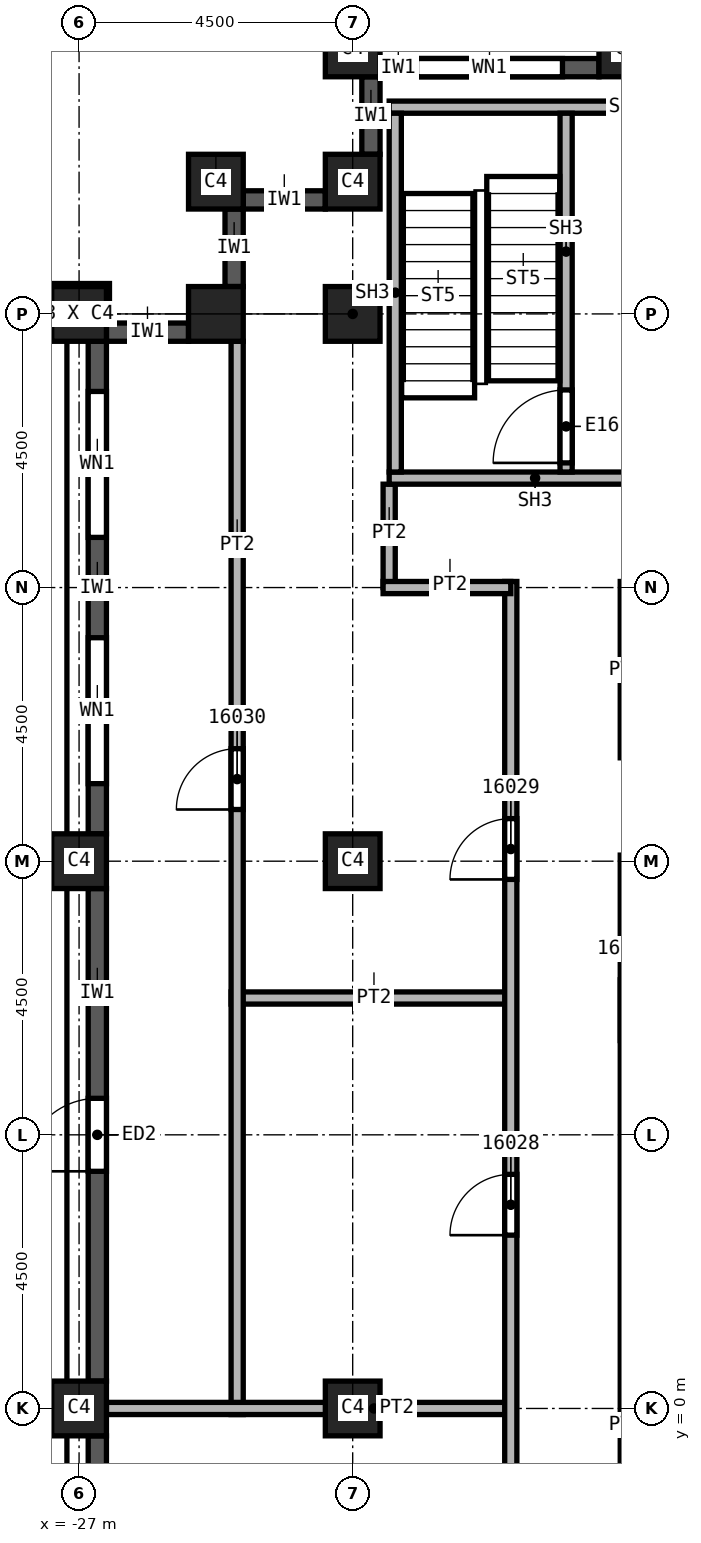
"""IFC4 building model, lengths in metres.
Left out: names, types, materials, properties, quantities, classifications, styles, units other than length and angle.
Written with IfcOpenShell. Run it as: python <this file> out.ifc"""

import sys

from ifc_helpers import new_model, si_unit, direction, frame, frame_2d, origin, origin_2d, place, context, subcontext, project, spatial, rectangle, extrude, element, fill, save


model = new_model("IFC4")
c1 = context("Model", 3, precision=1e-05, world=origin(), true_north=direction((0.0, 1.0)))
c2 = subcontext(c1, "Body", "Model", "MODEL_VIEW")
j1 = project(units=[si_unit("LENGTHUNIT", "METRE"), si_unit("PLANEANGLEUNIT", "RADIAN")], contexts=[c1])
p1 = place(None, origin())
s1 = spatial("IfcSite", under=j1, at=p1, CompositionType="ELEMENT")
p2 = place(p1, origin())
s2 = spatial("IfcBuilding", under=s1, at=p2, CompositionType="ELEMENT")
p3 = place(p2, frame((0.0, 0.0, 242.0)))
s3 = spatial("IfcBuildingStorey", under=s2, at=p3, CompositionType="ELEMENT", Elevation=242.0)
for number, where, z_axis, x_axis in (
    (1, (-22.5, 0.0, 0.0), (0.0, 0.0, 1.0), (1.0, 0.0, 0.0)),
    (2, (-22.5, 9.0, 0.0), (0.0, 0.0, 1.0), (1.0, 0.0, 0.0)),
    (3, (-22.5, 18.0, 0.0), (0.0, 0.0, 1.0), (1.0, 0.0, 0.0)),
    (4, (-18.0, 22.35, 0.0), (0.0, 0.0, 1.0), (1.0, 0.0, 0.0)),
    (5, (-22.5, 22.35, 0.0), (0.0, 0.0, 1.0), (1.0, 0.0, 0.0)),
    (6, (-27.0, 0.0, 0.0), (0.0, 0.0, 1.0), (0.0, 1.0, 0.0)),
    (7, (-27.0, 9.0, 0.0), (0.0, 0.0, 1.0), (0.0, 1.0, 0.0)),
    (8, (-27.0, 18.0, 0.0), (0.0, 0.0, 1.0), (0.0, 1.0, 0.0)),
    (9, (-22.5, 20.175, 0.0), (0.0, 0.0, 1.0), (1.0, 0.0, 0.0)),
    (10, (-24.75, 20.175, 0.0), (0.0, 0.0, 1.0), (1.0, 0.0, 0.0)),
    (11, (-24.75, 18.0, 0.0), (0.0, 0.0, 1.0), (1.0, 0.0, 0.0)),
):
    element("IfcColumn", number, at=place(p3, frame(where, z_axis=z_axis, x_axis=x_axis)), inside=s3, PredefinedType="COLUMN", context=c2, shape_type="SweptSolid", body=[
        extrude(rectangle(XDim=0.9, YDim=0.9, at=origin_2d()), origin(), (0.0, 0.0, 1.0), 3.72),
    ])
p4 = place(p3, frame((-24.45, 19.725, 0.0), z_axis=(0.0, 0.0, 1.0), x_axis=(0.0, -1.0, 0.0)))
e12 = element("IfcWall", 12, at=p4, inside=s3, PredefinedType="SOLIDWALL", context=c2, shape_type="SweptSolid", body=[
    extrude(rectangle(XDim=1.275, YDim=0.3, at=frame_2d((0.638, 0.0))), origin(), (0.0, 0.0, 1.0), 3.12),
])
p5 = place(p3, frame((-25.2, 17.7, 0.0), z_axis=(0.0, 0.0, 1.0), x_axis=(-1.0, 0.0, 0.0)))
e13 = element("IfcWall", 13, at=p5, inside=s3, PredefinedType="SOLIDWALL", context=c2, shape_type="SweptSolid", body=[
    extrude(rectangle(XDim=1.35, YDim=0.3, at=frame_2d((0.675, 0.0))), origin(), (0.0, 0.0, 1.0), 3.12),
])
p6 = place(p3, frame((-26.7, 17.55, 0.0), z_axis=(0.0, 0.0, 1.0), x_axis=(0.0, -1.0, 0.0)))
e14 = element("IfcWall", 14, at=p6, inside=s3, PredefinedType="SOLIDWALL", context=c2, shape_type="SweptSolid", body=[
    extrude(rectangle(XDim=8.1, YDim=0.3, at=frame_2d((4.05, 0.0))), origin(), (0.0, 0.0, 1.0), 3.12),
])
p7 = place(p6, frame((0.825, 0.0, 0.8)))
e15 = element("IfcOpeningElement", 15, at=p7, cuts=e14, PredefinedType="OPENING", context=c2, shape_type="SweptSolid", body=[
    extrude(rectangle(XDim=2.4, YDim=1.95, at=frame_2d((1.2, 0.975))), frame((0.0, 0.15, 0.0), z_axis=(0.0, -1.0, 0.0), x_axis=(1.0, 0.0, 0.0)), (0.0, 0.0, 1.0), 0.3),
])
p8 = place(p6, frame((4.875, 0.0, 0.8)))
e16 = element("IfcOpeningElement", 16, at=p8, cuts=e14, PredefinedType="OPENING", context=c2, shape_type="SweptSolid", body=[
    extrude(rectangle(XDim=2.4, YDim=1.95, at=frame_2d((1.2, 0.975))), frame((0.0, 0.15, 0.0), z_axis=(0.0, -1.0, 0.0), x_axis=(1.0, 0.0, 0.0)), (0.0, 0.0, 1.0), 0.3),
])
p9 = place(p3, frame((-26.7, 0.45, 0.0), z_axis=(0.0, 0.0, 1.0), x_axis=(0.0, 1.0, 0.0)))
e17 = element("IfcWall", 17, at=p9, inside=s3, PredefinedType="SOLIDWALL", context=c2, shape_type="SweptSolid", body=[
    extrude(rectangle(XDim=8.1, YDim=0.3, at=frame_2d((4.05, 0.0))), origin(), (0.0, 0.0, 1.0), 3.12),
])
p10 = place(p9, frame((3.45, 0.0, 0.0)))
e18 = element("IfcOpeningElement", 18, at=p10, cuts=e17, PredefinedType="OPENING", context=c2, shape_type="SweptSolid", body=[
    extrude(rectangle(XDim=1.2, YDim=2.4, at=frame_2d((0.6, 1.2))), frame((0.0, 0.15, 0.0), z_axis=(0.0, -1.0, 0.0), x_axis=(1.0, 0.0, 0.0)), (0.0, 0.0, 1.0), 0.3),
])
p11 = place(p3, frame((-26.7, -0.45, 0.0), z_axis=(0.0, 0.0, 1.0), x_axis=(0.0, -1.0, 0.0)))
e19 = element("IfcWall", 19, at=p11, inside=s3, PredefinedType="SOLIDWALL", context=c2, shape_type="SweptSolid", body=[
    extrude(rectangle(XDim=8.1, YDim=0.3, at=frame_2d((4.05, 0.0))), origin(), (0.0, 0.0, 1.0), 3.12),
])
p12 = place(p11, frame((0.825, 0.0, 0.8)))
e20 = element("IfcOpeningElement", 20, at=p12, cuts=e19, PredefinedType="OPENING", context=c2, shape_type="SweptSolid", body=[
    extrude(rectangle(XDim=2.4, YDim=1.95, at=frame_2d((1.2, 0.975))), frame((0.0, 0.15, 0.0), z_axis=(0.0, -1.0, 0.0), x_axis=(1.0, 0.0, 0.0)), (0.0, 0.0, 1.0), 0.3),
])
p13 = place(p11, frame((4.875, 0.0, 0.8)))
e21 = element("IfcOpeningElement", 21, at=p13, cuts=e19, PredefinedType="OPENING", context=c2, shape_type="SweptSolid", body=[
    extrude(rectangle(XDim=2.4, YDim=1.95, at=frame_2d((1.2, 0.975))), frame((0.0, 0.15, 0.0), z_axis=(0.0, -1.0, 0.0), x_axis=(1.0, 0.0, 0.0)), (0.0, 0.0, 1.0), 0.3),
])
p14 = place(p3, frame((-18.45, 22.05, 0.0), z_axis=(0.0, 0.0, 1.0), x_axis=(-1.0, 0.0, 0.0)))
e22 = element("IfcWall", 22, at=p14, inside=s3, PredefinedType="SOLIDWALL", context=c2, shape_type="SweptSolid", body=[
    extrude(rectangle(XDim=3.6, YDim=0.3, at=frame_2d((1.8, 0.0))), origin(), (0.0, 0.0, 1.0), 3.12),
])
p15 = place(p14, frame((0.6, 0.0, 0.8)))
e23 = element("IfcOpeningElement", 23, at=p15, cuts=e22, PredefinedType="OPENING", context=c2, shape_type="SweptSolid", body=[
    extrude(rectangle(XDim=2.4, YDim=1.95, at=frame_2d((1.2, 0.975))), frame((0.0, 0.15, 0.0), z_axis=(0.0, -1.0, 0.0), x_axis=(1.0, 0.0, 0.0)), (0.0, 0.0, 1.0), 0.3),
])
p16 = place(p3, frame((-22.2, 21.9, 0.0), z_axis=(0.0, 0.0, 1.0), x_axis=(0.0, -1.0, 0.0)))
e24 = element("IfcWall", 24, at=p16, inside=s3, PredefinedType="SOLIDWALL", context=c2, shape_type="SweptSolid", body=[
    extrude(rectangle(XDim=1.275, YDim=0.3, at=frame_2d((0.637, 0.0))), origin(), (0.0, 0.0, 1.0), 3.12),
])
p17 = place(p3, frame((-22.95, 19.875, 0.0), z_axis=(0.0, 0.0, 1.0), x_axis=(-1.0, 0.0, 0.0)))
e25 = element("IfcWall", 25, at=p17, inside=s3, PredefinedType="SOLIDWALL", context=c2, shape_type="SweptSolid", body=[
    extrude(rectangle(XDim=1.35, YDim=0.3, at=frame_2d((0.675, 0.0))), origin(), (0.0, 0.0, 1.0), 3.12),
])
p18 = place(p3, frame((-24.5, 6.75, 0.0), z_axis=(0.0, 0.0, 1.0), x_axis=(1.0, 0.0, 0.0)))
e26 = element("IfcWall", 26, at=p18, inside=s3, PredefinedType="PARTITIONING", context=c2, shape_type="SweptSolid", body=[
    extrude(rectangle(XDim=4.6, YDim=0.2, at=frame_2d((2.3, 0.0))), origin(), (0.0, 0.0, 1.0), 3.72),
])
p19 = place(p3, frame((-24.4, -0.1, 0.0), z_axis=(0.0, 0.0, 1.0), x_axis=(0.0, 1.0, 0.0)))
e27 = element("IfcWall", 27, at=p19, inside=s3, PredefinedType="PARTITIONING", context=c2, shape_type="SweptSolid", body=[
    extrude(rectangle(XDim=17.65, YDim=0.2, at=frame_2d((8.825, 0.0))), origin(), (0.0, 0.0, 1.0), 3.72),
])
p20 = place(p19, frame((9.95, 0.0, 0.0)))
e28 = element("IfcOpeningElement", 28, at=p20, cuts=e27, PredefinedType="OPENING", context=c2, shape_type="SweptSolid", body=[
    extrude(rectangle(XDim=1.0, YDim=2.1, at=frame_2d((0.5, 1.05))), frame((0.0, 0.1, 0.0), z_axis=(0.0, -1.0, 0.0), x_axis=(1.0, 0.0, 0.0)), (0.0, 0.0, 1.0), 0.2),
])
p21 = place(p3, frame((-19.9, 0.0, 0.0), z_axis=(0.0, 0.0, 1.0), x_axis=(-1.0, 0.0, 0.0)))
e29 = element("IfcWall", 29, at=p21, inside=s3, PredefinedType="PARTITIONING", context=c2, shape_type="SweptSolid", body=[
    extrude(rectangle(XDim=6.65, YDim=0.2, at=frame_2d((3.325, 0.0))), origin(), (0.0, 0.0, 1.0), 3.72),
])
p22 = place(p3, frame((-21.9, 13.5, 0.0), z_axis=(0.0, 0.0, 1.0), x_axis=(0.0, 1.0, 0.0)))
e30 = element("IfcWall", 30, at=p22, inside=s3, PredefinedType="PARTITIONING", context=c2, shape_type="SweptSolid", body=[
    extrude(rectangle(XDim=1.7, YDim=0.2, at=frame_2d((0.85, 0.0))), origin(), (0.0, 0.0, 1.0), 3.72),
])
p23 = place(p3, frame((-19.9, -8.7, 0.0), z_axis=(0.0, 0.0, 1.0), x_axis=(0.0, 1.0, 0.0)))
e31 = element("IfcWall", 31, at=p23, inside=s3, PredefinedType="PARTITIONING", context=c2, shape_type="SweptSolid", body=[
    extrude(rectangle(XDim=22.3, YDim=0.2, at=frame_2d((11.15, 0.0))), origin(), (0.0, 0.0, 1.0), 3.72),
])
p24 = place(p23, frame((11.55, 0.0, 0.0)))
e32 = element("IfcOpeningElement", 32, at=p24, cuts=e31, PredefinedType="OPENING", context=c2, shape_type="SweptSolid", body=[
    extrude(rectangle(XDim=1.0, YDim=2.1, at=frame_2d((0.5, 1.05))), frame((0.0, 0.1, 0.0), z_axis=(0.0, -1.0, 0.0), x_axis=(1.0, 0.0, 0.0)), (0.0, 0.0, 1.0), 0.2),
])
p25 = place(p23, frame((17.4, 0.0, 0.0)))
e33 = element("IfcOpeningElement", 33, at=p25, cuts=e31, PredefinedType="OPENING", context=c2, shape_type="SweptSolid", body=[
    extrude(rectangle(XDim=1.0, YDim=2.1, at=frame_2d((0.5, 1.05))), frame((0.0, 0.1, 0.0), z_axis=(0.0, -1.0, 0.0), x_axis=(1.0, 0.0, 0.0)), (0.0, 0.0, 1.0), 0.2),
])
p26 = place(p23, frame((1.15, 0.0, 0.0)))
e34 = element("IfcOpeningElement", 34, at=p26, cuts=e31, PredefinedType="OPENING", context=c2, shape_type="SweptSolid", body=[
    extrude(rectangle(XDim=1.0, YDim=2.1, at=frame_2d((0.5, 1.05))), frame((0.0, 0.1, 0.0), z_axis=(0.0, -1.0, 0.0), x_axis=(1.0, 0.0, 0.0)), (0.0, 0.0, 1.0), 0.2),
])
p27 = place(p3, frame((-19.9, 13.5, 0.0), z_axis=(0.0, 0.0, 1.0), x_axis=(-1.0, 0.0, 0.0)))
e35 = element("IfcWall", 35, at=p27, inside=s3, PredefinedType="PARTITIONING", context=c2, shape_type="SweptSolid", body=[
    extrude(rectangle(XDim=2.1, YDim=0.2, at=frame_2d((1.05, 0.0))), origin(), (0.0, 0.0, 1.0), 3.72),
])
p28 = place(p3, frame((-18.0, 9.1, 0.0), z_axis=(0.0, 0.0, 1.0), x_axis=(0.0, -1.0, 0.0)))
e36 = element("IfcWall", 36, at=p28, inside=s3, PredefinedType="PARTITIONING", context=c2, shape_type="SweptSolid", body=[
    extrude(rectangle(XDim=17.8, YDim=0.2, at=frame_2d((8.9, 0.0))), origin(), (0.0, 0.0, 1.0), 3.72),
])
p29 = place(p28, frame((11.8, 0.0, 0.0)))
e37 = element("IfcOpeningElement", 37, at=p29, cuts=e36, PredefinedType="OPENING", context=c2, shape_type="SweptSolid", body=[
    extrude(rectangle(XDim=1.0, YDim=2.1, at=frame_2d((0.5, 1.05))), frame((0.0, 0.1, 0.0), z_axis=(0.0, -1.0, 0.0), x_axis=(1.0, 0.0, 0.0)), (0.0, 0.0, 1.0), 0.2),
])
p30 = place(p28, frame((2.05, 0.0, 0.0)))
e38 = element("IfcOpeningElement", 38, at=p30, cuts=e36, PredefinedType="OPENING", context=c2, shape_type="SweptSolid", body=[
    extrude(rectangle(XDim=1.0, YDim=2.1, at=frame_2d((0.5, 1.05))), frame((0.0, 0.1, 0.0), z_axis=(0.0, -1.0, 0.0), x_axis=(1.0, 0.0, 0.0)), (0.0, 0.0, 1.0), 0.2),
])
p31 = place(p3, frame((-18.0, 13.6, 0.0), z_axis=(0.0, 0.0, 1.0), x_axis=(0.0, -1.0, 0.0)))
e39 = element("IfcWall", 39, at=p31, inside=s3, PredefinedType="PARTITIONING", context=c2, shape_type="SweptSolid", body=[
    extrude(rectangle(XDim=2.9, YDim=0.2, at=frame_2d((1.45, 0.0))), origin(), (0.0, 0.0, 1.0), 3.72),
])
p32 = place(p3, frame((-21.9, 15.3, 0.0), z_axis=(0.0, 0.0, 1.0), x_axis=(1.0, 0.0, 0.0)))
e40 = element("IfcWall", 40, at=p32, inside=s3, PredefinedType="SOLIDWALL", context=c2, shape_type="SweptSolid", body=[
    extrude(rectangle(XDim=8.275, YDim=0.2, at=frame_2d((4.137, 0.0))), origin(), (0.0, 0.0, 1.0), 3.72),
])
p33 = place(p32, frame((4.8, 0.0, 0.0)))
e41 = element("IfcOpeningElement", 41, at=p33, cuts=e40, PredefinedType="OPENING", context=c2, shape_type="SweptSolid", body=[
    extrude(rectangle(XDim=1.2, YDim=2.1, at=frame_2d((0.6, 1.05))), frame((0.0, 0.1, 0.0), z_axis=(0.0, -1.0, 0.0), x_axis=(1.0, 0.0, 0.0)), (0.0, 0.0, 1.0), 0.2),
])
p34 = place(p3, frame((-21.9, 21.4, 0.0), z_axis=(0.0, 0.0, 1.0), x_axis=(1.0, 0.0, 0.0)))
e42 = element("IfcWall", 42, at=p34, inside=s3, PredefinedType="SOLIDWALL", context=c2, shape_type="SweptSolid", body=[
    extrude(rectangle(XDim=7.8, YDim=0.2, at=frame_2d((3.9, 0.0))), origin(), (0.0, 0.0, 1.0), 3.72),
])
p35 = place(p3, frame((-21.8, 15.4, 0.0), z_axis=(0.0, 0.0, 1.0), x_axis=(0.0, 1.0, 0.0)))
e43 = element("IfcWall", 43, at=p35, inside=s3, PredefinedType="SOLIDWALL", context=c2, shape_type="SweptSolid", body=[
    extrude(rectangle(XDim=5.9, YDim=0.2, at=frame_2d((2.95, 0.0))), origin(), (0.0, 0.0, 1.0), 3.72),
])
p36 = place(p3, frame((-18.99, 15.4, 0.0), z_axis=(0.0, 0.0, 1.0), x_axis=(0.0, 1.0, 0.0)))
e44 = element("IfcWall", 44, at=p36, inside=s3, PredefinedType="SOLIDWALL", context=c2, shape_type="SweptSolid", body=[
    extrude(rectangle(XDim=5.9, YDim=0.2, at=frame_2d((2.95, 0.0))), origin(), (0.0, 0.0, 1.0), 3.72),
])
p37 = place(p36, frame((0.15, 0.0, 0.0)))
e45 = element("IfcOpeningElement", 45, at=p37, cuts=e44, PredefinedType="OPENING", context=c2, shape_type="SweptSolid", body=[
    extrude(rectangle(XDim=1.2, YDim=2.1, at=frame_2d((0.6, 1.05))), frame((0.0, 0.1, 0.0), z_axis=(0.0, -1.0, 0.0), x_axis=(1.0, 0.0, 0.0)), (0.0, 0.0, 1.0), 0.2),
])
p38 = place(p7, origin())
e46 = element("IfcWindow", 46, at=p38, inside=s3, PartitioningType="SINGLE_PANEL", PredefinedType="WINDOW", context=c2, shape_type="SweptSolid", body=[
    extrude(rectangle(XDim=2.4, YDim=1.95, at=frame_2d((1.2, 0.975))), frame((0.0, 0.03, 0.0), z_axis=(0.0, -1.0, 0.0), x_axis=(1.0, 0.0, 0.0)), (0.0, 0.0, 1.0), 0.06),
])
fill(e15, e46)
p39 = place(p8, origin())
e47 = element("IfcWindow", 47, at=p39, inside=s3, PartitioningType="SINGLE_PANEL", PredefinedType="WINDOW", context=c2, shape_type="SweptSolid", body=[
    extrude(rectangle(XDim=2.4, YDim=1.95, at=frame_2d((1.2, 0.975))), frame((0.0, 0.03, 0.0), z_axis=(0.0, -1.0, 0.0), x_axis=(1.0, 0.0, 0.0)), (0.0, 0.0, 1.0), 0.06),
])
fill(e16, e47)
p40 = place(p10, origin())
e48 = element("IfcDoor", 48, at=p40, inside=s3, OperationType="SINGLE_SWING_LEFT", PredefinedType="DOOR", context=c2, shape_type="SweptSolid", body=[
    extrude(rectangle(XDim=1.2, YDim=2.4, at=frame_2d((0.6, 1.2))), frame((0.0, 0.025, 0.0), z_axis=(0.0, -1.0, 0.0), x_axis=(1.0, 0.0, 0.0)), (0.0, 0.0, 1.0), 0.05),
])
fill(e18, e48)
p41 = place(p15, origin())
e49 = element("IfcWindow", 49, at=p41, inside=s3, PartitioningType="SINGLE_PANEL", PredefinedType="WINDOW", context=c2, shape_type="SweptSolid", body=[
    extrude(rectangle(XDim=2.4, YDim=1.95, at=frame_2d((1.2, 0.975))), frame((0.0, 0.03, 0.0), z_axis=(0.0, -1.0, 0.0), x_axis=(1.0, 0.0, 0.0)), (0.0, 0.0, 1.0), 0.06),
])
fill(e23, e49)
p42 = place(p24, origin())
e50 = element("IfcDoor", 50, at=p42, inside=s3, OperationType="SINGLE_SWING_LEFT", PredefinedType="DOOR", context=c2, shape_type="SweptSolid", body=[
    extrude(rectangle(XDim=1.0, YDim=2.1, at=frame_2d((0.5, 1.05))), frame((0.0, 0.025, 0.0), z_axis=(0.0, -1.0, 0.0), x_axis=(1.0, 0.0, 0.0)), (0.0, 0.0, 1.0), 0.05),
])
fill(e32, e50)
p43 = place(p25, origin())
e51 = element("IfcDoor", 51, at=p43, inside=s3, OperationType="SINGLE_SWING_RIGHT", PredefinedType="DOOR", context=c2, shape_type="SweptSolid", body=[
    extrude(rectangle(XDim=1.0, YDim=2.1, at=frame_2d((0.5, 1.05))), frame((0.0, 0.025, 0.0), z_axis=(0.0, -1.0, 0.0), x_axis=(1.0, 0.0, 0.0)), (0.0, 0.0, 1.0), 0.05),
])
fill(e33, e51)
p44 = place(p20, origin())
e52 = element("IfcDoor", 52, at=p44, inside=s3, OperationType="SINGLE_SWING_LEFT", PredefinedType="DOOR", context=c2, shape_type="SweptSolid", body=[
    extrude(rectangle(XDim=1.0, YDim=2.1, at=frame_2d((0.5, 1.05))), frame((0.0, 0.025, 0.0), z_axis=(0.0, -1.0, 0.0), x_axis=(1.0, 0.0, 0.0)), (0.0, 0.0, 1.0), 0.05),
])
fill(e28, e52)
p45 = place(p37, origin())
e53 = element("IfcDoor", 53, at=p45, inside=s3, OperationType="SINGLE_SWING_LEFT", PredefinedType="DOOR", context=c2, shape_type="SweptSolid", body=[
    extrude(rectangle(XDim=1.2, YDim=2.1, at=frame_2d((0.6, 1.05))), frame((0.0, 0.025, 0.0), z_axis=(0.0, -1.0, 0.0), x_axis=(1.0, 0.0, 0.0)), (0.0, 0.0, 1.0), 0.05),
])
fill(e45, e53)
save(model, sys.argv[1])
